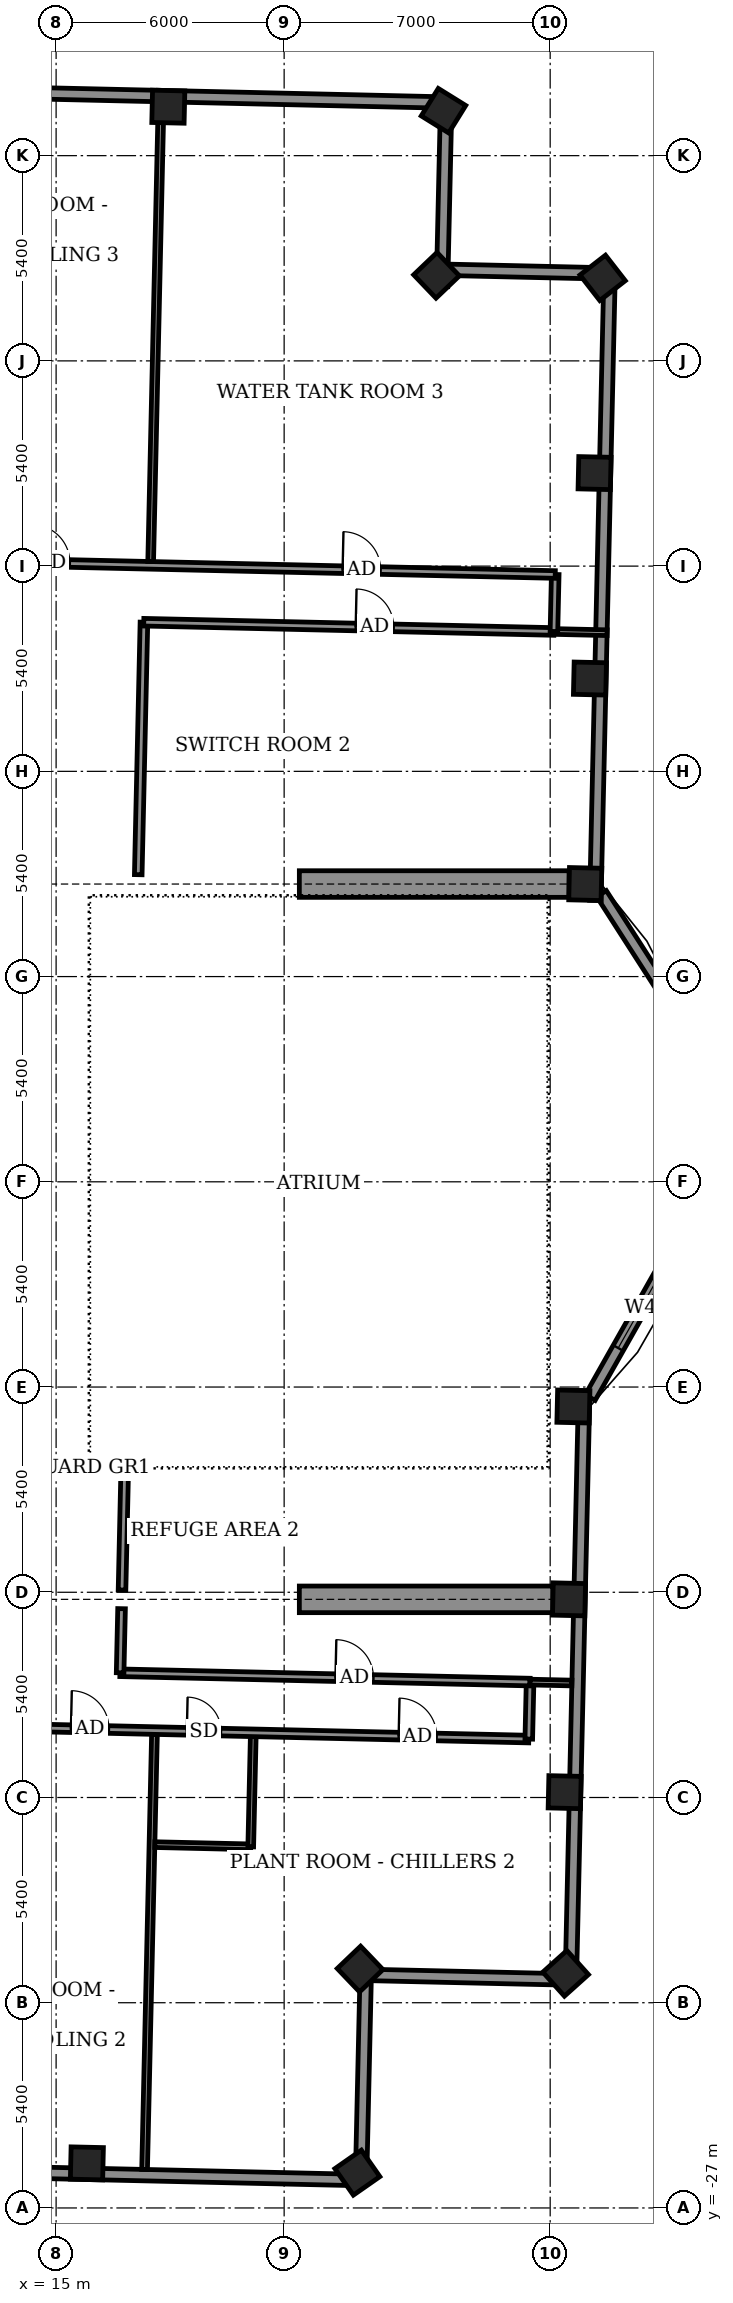
"""IFC4 building model, lengths in metres.
Left out: names, types, materials, properties, quantities, classifications, styles, units other than length and angle.
Written with IfcOpenShell. Run it as: python <this file> out.ifc"""

import sys

from ifc_helpers import new_model, si_unit, direction, frame, frame_2d, origin, origin_2d, place, context, subcontext, project, spatial, rectangle, extrude, element, fill, save


model = new_model("IFC4")
c1 = context("Model", 3, precision=1e-05, world=origin(), true_north=direction((0.0, 1.0)))
c2 = subcontext(c1, "Body", "Model", "MODEL_VIEW")
j1 = project(units=[si_unit("LENGTHUNIT", "METRE"), si_unit("PLANEANGLEUNIT", "RADIAN")], contexts=[c1])
p1 = place(None, origin())
s1 = spatial("IfcSite", under=j1, at=p1, CompositionType="ELEMENT")
p2 = place(p1, origin())
s2 = spatial("IfcBuilding", under=s1, at=p2, CompositionType="ELEMENT")
p3 = place(p2, frame((0.0, 0.0, 324.1)))
s3 = spatial("IfcBuildingStorey", under=s2, at=p3, CompositionType="ELEMENT", Elevation=324.1)
for number, where, z_axis, x_axis in (
    (1, (15.81, -25.827, -0.55), (0.0, 0.0, 1.0), (1.0, -0.023, 0.0)),
    (2, (22.927, -26.071, -0.55), (0.0, 0.0, 1.0), (0.82, 0.572, 0.0)),
    (3, (22.998, -20.714, -0.55), (0.0, 0.0, 1.0), (0.723, 0.691, 0.0)),
    (4, (28.407, -20.827, -0.55), (0.0, 0.0, 1.0), (0.744, 0.668, 0.0)),
    (5, (28.381, -16.059, -0.55), (0.0, 0.0, 1.0), (0.023, 1.0, 0.0)),
    (6, (28.496, -10.986, -0.55), (0.0, 0.0, 1.0), (0.023, 1.0, 0.0)),
    (7, (28.611, -5.912, -0.55), (0.0, 0.0, 1.0), (0.023, 1.0, 0.0)),
    (8, (28.923, 7.835, -0.55), (0.0, 0.0, 1.0), (0.023, 1.0, 0.0)),
    (9, (29.046, 13.242, -0.55), (0.0, 0.0, 1.0), (0.023, 1.0, 0.0)),
    (10, (29.168, 18.648, -0.55), (0.0, 0.0, 1.0), (0.023, 1.0, 0.0)),
    (11, (29.38, 23.784, -0.55), (0.0, 0.0, 1.0), (-0.613, 0.79, 0.0)),
    (12, (25.01, 23.851, -0.55), (0.0, 0.0, 1.0), (-0.691, 0.723, 0.0)),
    (13, (25.193, 28.183, -0.55), (0.0, 0.0, 1.0), (-0.849, 0.528, 0.0)),
    (14, (17.952, 28.288, -0.55), (0.0, 0.0, 1.0), (-1.0, 0.023, 0.0)),
):
    element("IfcColumn", number, at=place(p3, frame(where, z_axis=z_axis, x_axis=x_axis)), inside=s3, PredefinedType="COLUMN", context=c2, shape_type="SweptSolid", body=[
        extrude(rectangle(XDim=0.85, YDim=0.85, at=origin_2d()), origin(), (0.0, 0.0, 1.0), 5.6),
    ])
p4 = place(p3, frame((21.4, 7.835, 0.0), z_axis=(0.0, 0.0, 1.0), x_axis=(1.0, 0.0, 0.0)))
e15 = element("IfcWall", 15, at=p4, inside=s3, PredefinedType="SHEAR", context=c2, shape_type="SweptSolid", body=[
    extrude(rectangle(XDim=7.098, YDim=0.7, at=frame_2d((3.549, 0.0))), origin(), (0.0, 0.0, 1.0), 3.0),
])
p5 = place(p3, frame((21.4, -10.986, 0.0), z_axis=(0.0, 0.0, 1.0), x_axis=(1.0, 0.0, 0.0)))
e16 = element("IfcWall", 16, at=p5, inside=s3, PredefinedType="SHEAR", context=c2, shape_type="SweptSolid", body=[
    extrude(rectangle(XDim=6.671, YDim=0.7, at=frame_2d((3.335, 0.0))), origin(), (0.0, 0.0, 1.0), 3.0),
])
p6 = place(p3, frame((28.544, -20.99, 0.0), z_axis=(0.0, 0.0, 1.0), x_axis=(0.02271281838, 0.999742030667, 0.0)))
e17 = element("IfcWall", 17, at=p6, inside=s3, PredefinedType="SOLIDWALL", context=c2, shape_type="SweptSolid", body=[
    extrude(rectangle(XDim=15.5, YDim=0.3, at=frame_2d((7.75, 0.0))), origin(), (0.0, 0.0, 1.0), 5.05),
])
p7 = place(p3, frame((29.052, -5.678, 0.0), z_axis=(0.0, 0.0, 1.0), x_axis=(0.492554919955, 0.870281363025, 0.0)))
e18 = element("IfcWall", 18, at=p7, inside=s3, PredefinedType="SOLIDWALL", context=c2, shape_type="SweptSolid", body=[
    extrude(rectangle(XDim=5.398, YDim=0.3, at=frame_2d((2.699, 0.0))), origin(), (0.0, 0.0, 1.0), 5.05),
])
p8 = place(p7, frame((1.499, 0.0, 0.6)))
e19 = element("IfcOpeningElement", 19, at=p8, cuts=e18, PredefinedType="OPENING", context=c2, shape_type="SweptSolid", body=[
    extrude(rectangle(XDim=2.4, YDim=3.0, at=frame_2d((1.2, 1.5))), frame((0.0, 0.16, 0.0), z_axis=(0.0, -1.0, 0.0), x_axis=(1.0, 0.0, 0.0)), (0.0, 0.0, 1.0), 0.32),
])
p9 = place(p3, frame((31.281, 4.577, 0.0), z_axis=(0.0, 0.0, 1.0), x_axis=(-0.540429130882, 0.841389537904, 0.0)))
e20 = element("IfcWall", 20, at=p9, inside=s3, PredefinedType="SOLIDWALL", context=c2, shape_type="SweptSolid", body=[
    extrude(rectangle(XDim=3.569, YDim=0.3, at=frame_2d((1.785, 0.0))), origin(), (0.0, 0.0, 1.0), 5.05),
])
p10 = place(p3, frame((29.188, 7.404, 0.0), z_axis=(0.0, 0.0, 1.0), x_axis=(0.022728463996, 0.999741675096, 0.0)))
e21 = element("IfcWall", 21, at=p10, inside=s3, PredefinedType="SOLIDWALL", context=c2, shape_type="SweptSolid", body=[
    extrude(rectangle(XDim=16.499, YDim=0.3, at=frame_2d((8.25, 0.0))), origin(), (0.0, 0.0, 1.0), 5.05),
])
p11 = place(p3, frame((29.563, 23.899, 0.0), z_axis=(0.0, 0.0, 1.0), x_axis=(-0.999741204967, 0.022749133868, 0.0)))
e22 = element("IfcWall", 22, at=p11, inside=s3, PredefinedType="SOLIDWALL", context=c2, shape_type="SweptSolid", body=[
    extrude(rectangle(XDim=4.4, YDim=0.3, at=frame_2d((2.2, 0.0))), origin(), (0.0, 0.0, 1.0), 5.05),
])
p12 = place(p3, frame((25.154, 23.556, 0.0), z_axis=(0.0, 0.0, 1.0), x_axis=(0.022688192316, 0.999742589835, 0.0)))
e23 = element("IfcWall", 23, at=p12, inside=s3, PredefinedType="SOLIDWALL", context=c2, shape_type="SweptSolid", body=[
    extrude(rectangle(XDim=4.842, YDim=0.3, at=frame_2d((2.421, 0.0))), origin(), (0.0, 0.0, 1.0), 5.05),
])
p13 = place(p3, frame((25.264, 28.397, 0.0), z_axis=(0.0, 0.0, 1.0), x_axis=(-0.999742391375, 0.022696935658, 0.0)))
e24 = element("IfcWall", 24, at=p13, inside=s3, PredefinedType="SOLIDWALL", context=c2, shape_type="SweptSolid", body=[
    extrude(rectangle(XDim=51.9, YDim=0.3, at=frame_2d((25.95, 0.0))), origin(), (0.0, 0.0, 1.0), 5.05),
])
p14 = place(p3, frame((-28.264, -25.102, 0.0), z_axis=(0.0, 0.0, 1.0), x_axis=(0.999742520573, -0.022691244094, 0.0)))
e25 = element("IfcWall", 25, at=p14, inside=s3, PredefinedType="SOLIDWALL", context=c2, shape_type="SweptSolid", body=[
    extrude(rectangle(XDim=51.3, YDim=0.3, at=frame_2d((25.65, 0.0))), origin(), (0.0, 0.0, 1.0), 5.05),
])
p15 = place(p3, frame((23.023, -26.266, 0.0), z_axis=(0.0, 0.0, 1.0), x_axis=(0.022784045517, 0.999740409941, 0.0)))
e26 = element("IfcWall", 26, at=p15, inside=s3, PredefinedType="SOLIDWALL", context=c2, shape_type="SweptSolid", body=[
    extrude(rectangle(XDim=5.401, YDim=0.3, at=frame_2d((2.7, 0.0))), origin(), (0.0, 0.0, 1.0), 5.05),
])
p16 = place(p3, frame((23.146, -20.867, 0.0), z_axis=(0.0, 0.0, 1.0), x_axis=(0.999740292565, -0.022789195272, 0.0)))
e27 = element("IfcWall", 27, at=p16, inside=s3, PredefinedType="SOLIDWALL", context=c2, shape_type="SweptSolid", body=[
    extrude(rectangle(XDim=5.399, YDim=0.3, at=frame_2d((2.7, 0.0))), origin(), (0.0, 0.0, 1.0), 5.05),
])
p17 = place(p3, frame((17.328, -25.987, 0.0), z_axis=(0.0, 0.0, 1.0), x_axis=(0.022706391805, 0.999742176649, 0.0)))
e28 = element("IfcWall", 28, at=p17, inside=s3, PredefinedType="PARTITIONING", context=c2, shape_type="SweptSolid", body=[
    extrude(rectangle(XDim=11.451, YDim=0.15, at=frame_2d((5.726, 0.0))), origin(), (0.0, 0.0, 1.0), 4.55),
])
p18 = place(p3, frame((17.597, -17.44, 0.0), z_axis=(0.0, 0.0, 1.0), x_axis=(0.999735153469, -0.023013537724, 0.0)))
e29 = element("IfcWall", 29, at=p18, inside=s3, PredefinedType="PARTITIONING", context=c2, shape_type="SweptSolid", body=[
    extrude(rectangle(XDim=2.525, YDim=0.15, at=frame_2d((1.262, 0.0))), origin(), (0.0, 0.0, 1.0), 5.05),
])
p19 = place(p3, frame((20.121, -17.498, 0.0), z_axis=(0.0, 0.0, 1.0), x_axis=(0.022723317103, 0.999741792094, 0.0)))
e30 = element("IfcWall", 30, at=p19, inside=s3, PredefinedType="PARTITIONING", context=c2, shape_type="SweptSolid", body=[
    extrude(rectangle(XDim=2.901, YDim=0.15, at=frame_2d((1.45, 0.0))), origin(), (0.0, 0.0, 1.0), 5.05),
])
p20 = place(p3, frame((8.686, -14.237, 0.0), z_axis=(0.0, 0.0, 1.0), x_axis=(0.999741996802, -0.022714308948, 0.0)))
e31 = element("IfcWall", 31, at=p20, inside=s3, PredefinedType="PARTITIONING", context=c2, shape_type="SweptSolid", body=[
    extrude(rectangle(XDim=18.756, YDim=0.2, at=frame_2d((9.378, 0.0))), origin(), (0.0, 0.0, 1.0), 3.0),
])
p21 = place(p20, frame((1.456, 0.0, 0.0)))
e32 = element("IfcOpeningElement", 32, at=p21, cuts=e31, PredefinedType="OPENING", context=c2, shape_type="SweptSolid", body=[
    extrude(rectangle(XDim=0.9, YDim=2.1, at=frame_2d((0.45, 1.05))), frame((0.0, 0.11, 0.0), z_axis=(0.0, -1.0, 0.0), x_axis=(1.0, 0.0, 0.0)), (0.0, 0.0, 1.0), 0.22),
])
p22 = place(p20, frame((6.706, 0.0, 0.0)))
e33 = element("IfcOpeningElement", 33, at=p22, cuts=e31, PredefinedType="OPENING", context=c2, shape_type="SweptSolid", body=[
    extrude(rectangle(XDim=1.0, YDim=2.1, at=frame_2d((0.5, 1.05))), frame((0.0, 0.11, 0.0), z_axis=(0.0, -1.0, 0.0), x_axis=(1.0, 0.0, 0.0)), (0.0, 0.0, 1.0), 0.22),
])
p23 = place(p20, frame((3.856, 0.0, 0.0)))
e34 = element("IfcOpeningElement", 34, at=p23, cuts=e31, PredefinedType="OPENING", context=c2, shape_type="SweptSolid", body=[
    extrude(rectangle(XDim=0.9, YDim=2.1, at=frame_2d((0.45, 1.05))), frame((0.0, 0.11, 0.0), z_axis=(0.0, -1.0, 0.0), x_axis=(1.0, 0.0, 0.0)), (0.0, 0.0, 1.0), 0.22),
])
p24 = place(p20, frame((15.331, 0.0, 0.0)))
e35 = element("IfcOpeningElement", 35, at=p24, cuts=e31, PredefinedType="OPENING", context=c2, shape_type="SweptSolid", body=[
    extrude(rectangle(XDim=1.0, YDim=2.1, at=frame_2d((0.5, 1.05))), frame((0.0, 0.11, 0.0), z_axis=(0.0, -1.0, 0.0), x_axis=(1.0, 0.0, 0.0)), (0.0, 0.0, 1.0), 0.22),
])
p25 = place(p20, frame((9.756, 0.0, 0.0)))
e36 = element("IfcOpeningElement", 36, at=p25, cuts=e31, PredefinedType="OPENING", context=c2, shape_type="SweptSolid", body=[
    extrude(rectangle(XDim=0.9, YDim=2.1, at=frame_2d((0.45, 1.05))), frame((0.0, 0.11, 0.0), z_axis=(0.0, -1.0, 0.0), x_axis=(1.0, 0.0, 0.0)), (0.0, 0.0, 1.0), 0.22),
])
p26 = place(p3, frame((27.437, -14.663, 0.0), z_axis=(0.0, 0.0, 1.0), x_axis=(0.022617910375, 0.999744182344, 0.0)))
e37 = element("IfcWall", 37, at=p26, inside=s3, PredefinedType="PARTITIONING", context=c2, shape_type="SweptSolid", body=[
    extrude(rectangle(XDim=1.5, YDim=0.2, at=frame_2d((0.75, 0.0))), origin(), (0.0, 0.0, 1.0), 5.05),
])
p27 = place(p3, frame((16.679, -12.918, 0.0), z_axis=(0.0, 0.0, 1.0), x_axis=(0.999742162372, -0.022707020428, 0.0)))
e38 = element("IfcWall", 38, at=p27, inside=s3, PredefinedType="PARTITIONING", context=c2, shape_type="SweptSolid", body=[
    extrude(rectangle(XDim=10.795, YDim=0.2, at=frame_2d((5.397, 0.0))), origin(), (0.0, 0.0, 1.0), 5.05),
])
p28 = place(p27, frame((5.673, 0.0, 0.0)))
e39 = element("IfcOpeningElement", 39, at=p28, cuts=e38, PredefinedType="OPENING", context=c2, shape_type="SweptSolid", body=[
    extrude(rectangle(XDim=1.0, YDim=2.1, at=frame_2d((0.5, 1.05))), frame((0.0, 0.11, 0.0), z_axis=(0.0, -1.0, 0.0), x_axis=(1.0, 0.0, 0.0)), (0.0, 0.0, 1.0), 0.22),
])
p29 = place(p3, frame((16.684, -12.919, 0.0), z_axis=(0.0, 0.0, 1.0), x_axis=(0.022425617902, 0.999748514208, 0.0)))
e40 = element("IfcWall", 40, at=p29, inside=s3, PredefinedType="PARTITIONING", context=c2, shape_type="SweptSolid", body=[
    extrude(rectangle(XDim=1.688, YDim=0.2, at=frame_2d((0.844, 0.0))), origin(), (0.0, 0.0, 1.0), 3.0),
])
p30 = place(p3, frame((27.467, -13.163, 0.0), z_axis=(0.0, 0.0, 1.0), x_axis=(0.999745701647, -0.022550654924, 0.0)))
e41 = element("IfcWall", 41, at=p30, inside=s3, PredefinedType="PARTITIONING", context=c2, shape_type="SweptSolid", body=[
    extrude(rectangle(XDim=1.104, YDim=0.15, at=frame_2d((0.552, 0.0))), origin(), (0.0, 0.0, 1.0), 4.55),
])
p31 = place(p3, frame((16.734, -10.741, 0.0), z_axis=(0.0, 0.0, 1.0), x_axis=(0.022529715494, 0.999746173746, 0.0)))
e42 = element("IfcWall", 42, at=p31, inside=s3, PredefinedType="PARTITIONING", context=c2, shape_type="SweptSolid", body=[
    extrude(rectangle(XDim=3.067, YDim=0.2, at=frame_2d((1.533, 0.0))), origin(), (0.0, 0.0, 1.0), 3.0),
])
p32 = place(p3, frame((17.161, 8.081, 0.0), z_axis=(0.0, 0.0, 1.0), x_axis=(0.022596213667, 0.999744672968, 0.0)))
e43 = element("IfcWall", 43, at=p32, inside=s3, PredefinedType="PARTITIONING", context=c2, shape_type="SweptSolid", body=[
    extrude(rectangle(XDim=6.645, YDim=0.2, at=frame_2d((3.322, 0.0))), origin(), (0.0, 0.0, 1.0), 3.0),
])
p33 = place(p3, frame((17.306, 14.724, 0.0), z_axis=(0.0, 0.0, 1.0), x_axis=(0.999744269809, -0.022614043969, 0.0)))
e44 = element("IfcWall", 44, at=p33, inside=s3, PredefinedType="PARTITIONING", context=c2, shape_type="SweptSolid", body=[
    extrude(rectangle(XDim=10.796, YDim=0.2, at=frame_2d((5.398, 0.0))), origin(), (0.0, 0.0, 1.0), 5.05),
])
p34 = place(p33, frame((5.578, 0.0, 0.0)))
e45 = element("IfcOpeningElement", 45, at=p34, cuts=e44, PredefinedType="OPENING", context=c2, shape_type="SweptSolid", body=[
    extrude(rectangle(XDim=1.0, YDim=2.1, at=frame_2d((0.5, 1.05))), frame((0.0, 0.11, 0.0), z_axis=(0.0, -1.0, 0.0), x_axis=(1.0, 0.0, 0.0)), (0.0, 0.0, 1.0), 0.22),
])
p35 = place(p3, frame((28.099, 14.48, 0.0), z_axis=(0.0, 0.0, 1.0), x_axis=(0.999738763928, -0.022856156732, 0.0)))
e46 = element("IfcWall", 46, at=p35, inside=s3, PredefinedType="PARTITIONING", context=c2, shape_type="SweptSolid", body=[
    extrude(rectangle(XDim=1.399, YDim=0.15, at=frame_2d((0.7, 0.0))), origin(), (0.0, 0.0, 1.0), 4.55),
])
p36 = place(p3, frame((28.099, 14.48, 0.0), z_axis=(0.0, 0.0, 1.0), x_axis=(0.022632637625, 0.99974384905, 0.0)))
e47 = element("IfcWall", 47, at=p36, inside=s3, PredefinedType="PARTITIONING", context=c2, shape_type="SweptSolid", body=[
    extrude(rectangle(XDim=1.5, YDim=0.2, at=frame_2d((0.75, 0.0))), origin(), (0.0, 0.0, 1.0), 5.05),
])
p37 = place(p3, frame((12.033, 16.344, 0.0), z_axis=(0.0, 0.0, 1.0), x_axis=(0.999743133118, -0.022664240197, 0.0)))
e48 = element("IfcWall", 48, at=p37, inside=s3, PredefinedType="PARTITIONING", context=c2, shape_type="SweptSolid", body=[
    extrude(rectangle(XDim=16.104, YDim=0.2, at=frame_2d((8.052, 0.0))), origin(), (0.0, 0.0, 1.0), 5.05),
])
p38 = place(p37, frame((10.508, 0.0, 0.0)))
e49 = element("IfcOpeningElement", 49, at=p38, cuts=e48, PredefinedType="OPENING", context=c2, shape_type="SweptSolid", body=[
    extrude(rectangle(XDim=1.0, YDim=2.1, at=frame_2d((0.5, 1.05))), frame((0.0, 0.11, 0.0), z_axis=(0.0, -1.0, 0.0), x_axis=(1.0, 0.0, 0.0)), (0.0, 0.0, 1.0), 0.22),
])
p39 = place(p37, frame((2.329, 0.0, 0.0)))
e50 = element("IfcOpeningElement", 50, at=p39, cuts=e48, PredefinedType="OPENING", context=c2, shape_type="SweptSolid", body=[
    extrude(rectangle(XDim=1.0, YDim=2.1, at=frame_2d((0.5, 1.05))), frame((0.0, 0.11, 0.0), z_axis=(0.0, -1.0, 0.0), x_axis=(1.0, 0.0, 0.0)), (0.0, 0.0, 1.0), 0.22),
])
p40 = place(p3, frame((17.488, 16.321, 0.0), z_axis=(0.0, 0.0, 1.0), x_axis=(0.022661475803, 0.999743195783, 0.0)))
e51 = element("IfcWall", 51, at=p40, inside=s3, PredefinedType="PARTITIONING", context=c2, shape_type="SweptSolid", body=[
    extrude(rectangle(XDim=12.4, YDim=0.15, at=frame_2d((6.2, 0.0))), origin(), (0.0, 0.0, 1.0), 5.05),
])
p41 = place(p8, origin())
e52 = element("IfcWindow", 52, at=p41, inside=s3, PartitioningType="SINGLE_PANEL", PredefinedType="WINDOW", context=c2, shape_type="SweptSolid", body=[
    extrude(rectangle(XDim=2.4, YDim=3.0, at=frame_2d((1.2, 1.5))), frame((0.0, 0.03, 0.0), z_axis=(0.0, -1.0, 0.0), x_axis=(1.0, 0.0, 0.0)), (0.0, 0.0, 1.0), 0.06),
])
fill(e19, e52)
p42 = place(p22, origin())
e53 = element("IfcDoor", 53, at=p42, inside=s3, OperationType="SINGLE_SWING_RIGHT", PredefinedType="DOOR", context=c2, shape_type="SweptSolid", body=[
    extrude(rectangle(XDim=1.0, YDim=2.1, at=frame_2d((0.5, 1.05))), frame((0.0, 0.025, 0.0), z_axis=(0.0, -1.0, 0.0), x_axis=(1.0, 0.0, 0.0)), (0.0, 0.0, 1.0), 0.05),
])
fill(e33, e53)
p43 = place(p24, origin())
e54 = element("IfcDoor", 54, at=p43, inside=s3, OperationType="SINGLE_SWING_LEFT", PredefinedType="DOOR", context=c2, shape_type="SweptSolid", body=[
    extrude(rectangle(XDim=1.0, YDim=2.1, at=frame_2d((0.5, 1.05))), frame((0.0, 0.025, 0.0), z_axis=(0.0, -1.0, 0.0), x_axis=(1.0, 0.0, 0.0)), (0.0, 0.0, 1.0), 0.05),
])
fill(e35, e54)
p44 = place(p25, origin())
e55 = element("IfcDoor", 55, at=p44, inside=s3, OperationType="SINGLE_SWING_RIGHT", PredefinedType="DOOR", context=c2, shape_type="SweptSolid", body=[
    extrude(rectangle(XDim=0.9, YDim=2.1, at=frame_2d((0.45, 1.05))), frame((0.0, 0.025, 0.0), z_axis=(0.0, -1.0, 0.0), x_axis=(1.0, 0.0, 0.0)), (0.0, 0.0, 1.0), 0.05),
])
fill(e36, e55)
p45 = place(p28, origin())
e56 = element("IfcDoor", 56, at=p45, inside=s3, OperationType="SINGLE_SWING_RIGHT", PredefinedType="DOOR", context=c2, shape_type="SweptSolid", body=[
    extrude(rectangle(XDim=1.0, YDim=2.1, at=frame_2d((0.5, 1.05))), frame((0.0, 0.025, 0.0), z_axis=(0.0, -1.0, 0.0), x_axis=(1.0, 0.0, 0.0)), (0.0, 0.0, 1.0), 0.05),
])
fill(e39, e56)
p46 = place(p34, origin())
e57 = element("IfcDoor", 57, at=p46, inside=s3, OperationType="SINGLE_SWING_LEFT", PredefinedType="DOOR", context=c2, shape_type="SweptSolid", body=[
    extrude(rectangle(XDim=1.0, YDim=2.1, at=frame_2d((0.5, 1.05))), frame((0.0, 0.025, 0.0), z_axis=(0.0, -1.0, 0.0), x_axis=(1.0, 0.0, 0.0)), (0.0, 0.0, 1.0), 0.05),
])
fill(e45, e57)
p47 = place(p38, origin())
e58 = element("IfcDoor", 58, at=p47, inside=s3, OperationType="SINGLE_SWING_RIGHT", PredefinedType="DOOR", context=c2, shape_type="SweptSolid", body=[
    extrude(rectangle(XDim=1.0, YDim=2.1, at=frame_2d((0.5, 1.05))), frame((0.0, 0.025, 0.0), z_axis=(0.0, -1.0, 0.0), x_axis=(1.0, 0.0, 0.0)), (0.0, 0.0, 1.0), 0.05),
])
fill(e49, e58)
p48 = place(p39, origin())
e59 = element("IfcDoor", 59, at=p48, inside=s3, OperationType="SINGLE_SWING_LEFT", PredefinedType="DOOR", context=c2, shape_type="SweptSolid", body=[
    extrude(rectangle(XDim=1.0, YDim=2.1, at=frame_2d((0.5, 1.05))), frame((0.0, 0.025, 0.0), z_axis=(0.0, -1.0, 0.0), x_axis=(1.0, 0.0, 0.0)), (0.0, 0.0, 1.0), 0.05),
])
fill(e50, e59)
save(model, sys.argv[1])
